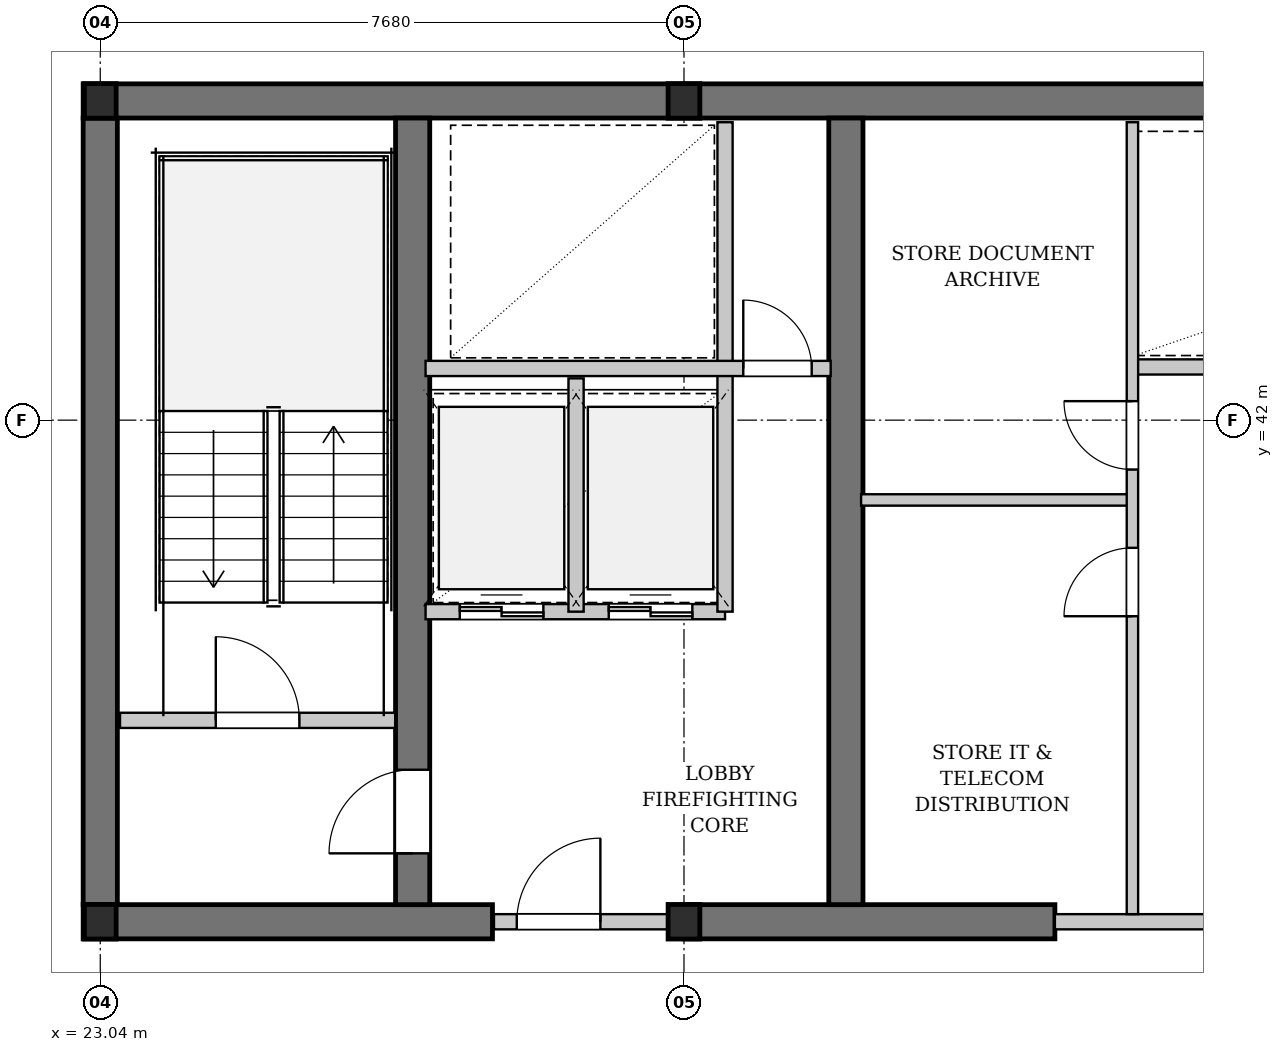
"""IFC4 building model, lengths in metres.
Left out: names, types, materials, properties, quantities, classifications, styles, units other than length and angle.
Written with IfcOpenShell. Run it as: python <this file> out.ifc"""

import sys

from ifc_helpers import new_model, si_unit, direction, frame, frame_2d, origin, origin_2d, place, context, subcontext, project, spatial, rectangle, i_section, extrude, element, fill, save


model = new_model("IFC4")
c1 = context("Model", 3, precision=1e-05, world=origin(), true_north=direction((0.0, 1.0)))
c2 = subcontext(c1, "Body", "Model", "MODEL_VIEW")
j1 = project(units=[si_unit("LENGTHUNIT", "METRE"), si_unit("PLANEANGLEUNIT", "RADIAN")], contexts=[c1])
p1 = place(None, origin())
s1 = spatial("IfcSite", under=j1, at=p1, CompositionType="ELEMENT")
p2 = place(p1, origin())
s2 = spatial("IfcBuilding", under=s1, at=p2, CompositionType="ELEMENT")
p3 = place(p2, frame((0.0, 0.0, 172.1)))
s3 = spatial("IfcBuildingStorey", under=s2, at=p3, CompositionType="ELEMENT", Elevation=172.1)
p4 = place(p3, frame((22.815, 46.2, 0.0), z_axis=(0.0, 0.0, 1.0), x_axis=(1.0, 0.0, 0.0)))
e1 = element("IfcWall", 1, at=p4, inside=s3, PredefinedType="SHEAR", context=c2, shape_type="SweptSolid", body=[
    extrude(rectangle(XDim=31.17, YDim=0.45, at=frame_2d((15.585, 0.0))), origin(), (0.0, 0.0, 1.0), 3.08),
])
p5 = place(p3, frame((22.815, 35.4, 0.0), z_axis=(0.0, 0.0, 1.0), x_axis=(1.0, 0.0, 0.0)))
e2 = element("IfcWall", 2, at=p5, inside=s3, PredefinedType="SHEAR", context=c2, shape_type="SweptSolid", body=[
    extrude(rectangle(XDim=5.385, YDim=0.45, at=frame_2d((2.692, 0.0))), origin(), (0.0, 0.0, 1.0), 3.08),
])
p6 = place(p3, frame((30.72, 35.4, 0.0), z_axis=(0.0, 0.0, 1.0), x_axis=(1.0, 0.0, 0.0)))
e3 = element("IfcWall", 3, at=p6, inside=s3, PredefinedType="SHEAR", context=c2, shape_type="SweptSolid", body=[
    extrude(rectangle(XDim=4.88, YDim=0.45, at=frame_2d((2.44, 0.0))), origin(), (0.0, 0.0, 1.0), 3.08),
])
p7 = place(p3, frame((23.04, 35.625, 0.0), z_axis=(0.0, 0.0, 1.0), x_axis=(0.0, 1.0, 0.0)))
e4 = element("IfcWall", 4, at=p7, inside=s3, PredefinedType="SHEAR", context=c2, shape_type="SweptSolid", body=[
    extrude(rectangle(XDim=10.35, YDim=0.45, at=frame_2d((5.175, 0.0))), origin(), (0.0, 0.0, 1.0), 3.08),
])
p8 = place(p3, frame((27.15, 35.625, 0.0), z_axis=(0.0, 0.0, 1.0), x_axis=(0.0, 1.0, 0.0)))
e5 = element("IfcWall", 5, at=p8, inside=s3, PredefinedType="SHEAR", context=c2, shape_type="SweptSolid", body=[
    extrude(rectangle(XDim=10.35, YDim=0.45, at=frame_2d((5.175, 0.0))), origin(), (0.0, 0.0, 1.0), 3.08),
])
p9 = place(p8, frame((0.675, 0.0, 0.0)))
e6 = element("IfcOpeningElement", 6, at=p9, cuts=e5, PredefinedType="OPENING", context=c2, shape_type="SweptSolid", body=[
    extrude(rectangle(XDim=1.1, YDim=2.15, at=frame_2d((0.55, 1.075))), frame((0.0, 0.235, 0.0), z_axis=(0.0, -1.0, 0.0), x_axis=(1.0, 0.0, 0.0)), (0.0, 0.0, 1.0), 0.47),
])
p10 = place(p3, frame((32.85, 35.625, 0.0), z_axis=(0.0, 0.0, 1.0), x_axis=(0.0, 1.0, 0.0)))
e7 = element("IfcWall", 7, at=p10, inside=s3, PredefinedType="SHEAR", context=c2, shape_type="SweptSolid", body=[
    extrude(rectangle(XDim=10.35, YDim=0.45, at=frame_2d((5.175, 0.0))), origin(), (0.0, 0.0, 1.0), 3.08),
])
for number, where, z_axis, x_axis in (
    (8, (23.04, 35.4, 0.0), (0.0, 0.0, 1.0), (1.0, 0.0, 0.0)),
    (9, (23.04, 46.2, 0.0), (0.0, 0.0, 1.0), (1.0, 0.0, 0.0)),
    (10, (30.72, 35.4, 0.0), (0.0, 0.0, 1.0), (1.0, 0.0, 0.0)),
    (11, (30.72, 46.2, 0.0), (0.0, 0.0, 1.0), (1.0, 0.0, 0.0)),
):
    element("IfcColumn", number, at=place(p3, frame(where, z_axis=z_axis, x_axis=x_axis)), inside=s3, PredefinedType="COLUMN", context=c2, shape_type="SweptSolid", body=[
        extrude(i_section(OverallWidth=0.418, OverallDepth=0.455, WebThickness=0.042, FlangeThickness=0.068, FilletRadius=0.015, at=origin_2d()), origin(), (0.0, 0.0, 1.0), 3.3),
    ])
p11 = place(p3, frame((23.3, 38.05, 0.0), z_axis=(0.0, 0.0, 1.0), x_axis=(1.0, 0.0, 0.0)))
e12 = element("IfcWall", 12, at=p11, inside=s3, PredefinedType="PARTITIONING", context=c2, shape_type="SweptSolid", body=[
    extrude(rectangle(XDim=3.62, YDim=0.2, at=frame_2d((1.81, 0.0))), origin(), (0.0, 0.0, 1.0), 3.08),
])
p12 = place(p11, frame((1.26, 0.0, 0.0)))
e13 = element("IfcOpeningElement", 13, at=p12, cuts=e12, PredefinedType="OPENING", context=c2, shape_type="SweptSolid", body=[
    extrude(rectangle(XDim=1.1, YDim=2.15, at=frame_2d((0.55, 1.075))), frame((0.0, 0.11, 0.0), z_axis=(0.0, -1.0, 0.0), x_axis=(1.0, 0.0, 0.0)), (0.0, 0.0, 1.0), 0.22),
])
p13 = place(p3, frame((28.22, 35.4, 0.0), z_axis=(0.0, 0.0, 1.0), x_axis=(1.0, 0.0, 0.0)))
e14 = element("IfcWall", 14, at=p13, inside=s3, PredefinedType="PARTITIONING", context=c2, shape_type="SweptSolid", body=[
    extrude(rectangle(XDim=2.5, YDim=0.2, at=frame_2d((1.25, 0.0))), origin(), (0.0, 0.0, 1.0), 2.475),
])
p14 = place(p13, frame((0.3, 0.0, 0.0)))
e15 = element("IfcOpeningElement", 15, at=p14, cuts=e14, PredefinedType="OPENING", context=c2, shape_type="SweptSolid", body=[
    extrude(rectangle(XDim=1.1, YDim=2.15, at=frame_2d((0.55, 1.075))), frame((0.0, 0.11, 0.0), z_axis=(0.0, -1.0, 0.0), x_axis=(1.0, 0.0, 0.0)), (0.0, 0.0, 1.0), 0.22),
])
p15 = place(p3, frame((27.32, 39.48, 0.0), z_axis=(0.0, 0.0, 1.0), x_axis=(1.0, 0.0, 0.0)))
e16 = element("IfcWall", 16, at=p15, inside=s3, PredefinedType="PARTITIONING", context=c2, shape_type="SweptSolid", body=[
    extrude(rectangle(XDim=3.94, YDim=0.2, at=frame_2d((1.97, 0.0))), origin(), (0.0, 0.0, 1.0), 3.08),
])
p16 = place(p15, frame((0.45, 0.0, 0.0)))
e17 = element("IfcOpeningElement", 17, at=p16, cuts=e16, PredefinedType="OPENING", context=c2, shape_type="SweptSolid", body=[
    extrude(rectangle(XDim=1.1, YDim=2.2, at=frame_2d((0.55, 1.1))), frame((0.0, 0.11, 0.0), z_axis=(0.0, -1.0, 0.0), x_axis=(1.0, 0.0, 0.0)), (0.0, 0.0, 1.0), 0.22),
])
p17 = place(p15, frame((2.41, 0.0, 0.0)))
e18 = element("IfcOpeningElement", 18, at=p17, cuts=e16, PredefinedType="OPENING", context=c2, shape_type="SweptSolid", body=[
    extrude(rectangle(XDim=1.1, YDim=2.2, at=frame_2d((0.55, 1.1))), frame((0.0, 0.11, 0.0), z_axis=(0.0, -1.0, 0.0), x_axis=(1.0, 0.0, 0.0)), (0.0, 0.0, 1.0), 0.22),
])
p18 = place(p3, frame((29.3, 39.48, 0.0), z_axis=(0.0, 0.0, 1.0), x_axis=(0.0, 1.0, 0.0)))
e19 = element("IfcWall", 19, at=p18, inside=s3, PredefinedType="PARTITIONING", context=c2, shape_type="SweptSolid", body=[
    extrude(rectangle(XDim=3.07, YDim=0.2, at=frame_2d((1.535, 0.0))), origin(), (0.0, 0.0, 1.0), 3.08),
])
p19 = place(p3, frame((31.26, 39.48, 0.0), z_axis=(0.0, 0.0, 1.0), x_axis=(0.0, 1.0, 0.0)))
e20 = element("IfcWall", 20, at=p19, inside=s3, PredefinedType="PARTITIONING", context=c2, shape_type="SweptSolid", body=[
    extrude(rectangle(XDim=6.44, YDim=0.2, at=frame_2d((3.22, 0.0))), origin(), (0.0, 0.0, 1.0), 3.08),
])
p20 = place(p3, frame((27.32, 42.68, 0.0), z_axis=(0.0, 0.0, 1.0), x_axis=(1.0, 0.0, 0.0)))
e21 = element("IfcWall", 21, at=p20, inside=s3, PredefinedType="PARTITIONING", context=c2, shape_type="SweptSolid", body=[
    extrude(rectangle(XDim=5.33, YDim=0.2, at=frame_2d((2.665, 0.0))), origin(), (0.0, 0.0, 1.0), 3.08),
])
p21 = place(p20, frame((4.18, 0.0, 0.0)))
e22 = element("IfcOpeningElement", 22, at=p21, cuts=e21, PredefinedType="OPENING", context=c2, shape_type="SweptSolid", body=[
    extrude(rectangle(XDim=0.9, YDim=2.15, at=frame_2d((0.45, 1.075))), frame((0.0, 0.11, 0.0), z_axis=(0.0, -1.0, 0.0), x_axis=(1.0, 0.0, 0.0)), (0.0, 0.0, 1.0), 0.22),
])
p22 = place(p3, frame((35.6, 35.4, 0.0), z_axis=(0.0, 0.0, 1.0), x_axis=(1.0, 0.0, 0.0)))
e23 = element("IfcWall", 23, at=p22, inside=s3, PredefinedType="PARTITIONING", context=c2, shape_type="SweptSolid", body=[
    extrude(rectangle(XDim=6.5, YDim=0.2, at=frame_2d((3.25, 0.0))), origin(), (0.0, 0.0, 1.0), 2.475),
])
p23 = place(p22, frame((3.8, 0.0, 0.0)))
e24 = element("IfcOpeningElement", 24, at=p23, cuts=e23, PredefinedType="OPENING", context=c2, shape_type="SweptSolid", body=[
    extrude(rectangle(XDim=1.8, YDim=2.3, at=frame_2d((0.9, 1.15))), frame((0.0, 0.11, 0.0), z_axis=(0.0, -1.0, 0.0), x_axis=(1.0, 0.0, 0.0)), (0.0, 0.0, 1.0), 0.22),
])
p24 = place(p3, frame((36.6, 42.7, 0.0), z_axis=(0.0, 0.0, 1.0), x_axis=(1.0, 0.0, 0.0)))
e25 = element("IfcWall", 25, at=p24, inside=s3, PredefinedType="PARTITIONING", context=c2, shape_type="SweptSolid", body=[
    extrude(rectangle(XDim=5.25, YDim=0.2, at=frame_2d((2.625, 0.0))), origin(), (0.0, 0.0, 1.0), 3.08),
])
p25 = place(p3, frame((33.05, 40.95, 0.0), z_axis=(0.0, 0.0, 1.0), x_axis=(1.0, 0.0, 0.0)))
e26 = element("IfcWall", 26, at=p25, inside=s3, PredefinedType="PARTITIONING", context=c2, shape_type="SweptSolid", body=[
    extrude(rectangle(XDim=3.57, YDim=0.15, at=frame_2d((1.785, 0.0))), origin(), (0.0, 0.0, 1.0), 3.08),
])
p26 = place(p3, frame((36.62, 35.5, 0.0), z_axis=(0.0, 0.0, 1.0), x_axis=(0.0, 1.0, 0.0)))
e27 = element("IfcWall", 27, at=p26, inside=s3, PredefinedType="PARTITIONING", context=c2, shape_type="SweptSolid", body=[
    extrude(rectangle(XDim=10.42, YDim=0.15, at=frame_2d((5.21, 0.0))), origin(), (0.0, 0.0, 1.0), 3.08),
])
p27 = place(p26, frame((3.92, 0.0, 0.0)))
e28 = element("IfcOpeningElement", 28, at=p27, cuts=e27, PredefinedType="OPENING", context=c2, shape_type="SweptSolid", body=[
    extrude(rectangle(XDim=0.9, YDim=2.15, at=frame_2d((0.45, 1.075))), frame((0.0, 0.085, 0.0), z_axis=(0.0, -1.0, 0.0), x_axis=(1.0, 0.0, 0.0)), (0.0, 0.0, 1.0), 0.17),
])
p28 = place(p26, frame((5.85, 0.0, 0.0)))
e29 = element("IfcOpeningElement", 29, at=p28, cuts=e27, PredefinedType="OPENING", context=c2, shape_type="SweptSolid", body=[
    extrude(rectangle(XDim=0.9, YDim=2.15, at=frame_2d((0.45, 1.075))), frame((0.0, 0.085, 0.0), z_axis=(0.0, -1.0, 0.0), x_axis=(1.0, 0.0, 0.0)), (0.0, 0.0, 1.0), 0.17),
])
p29 = place(p12, origin())
e30 = element("IfcDoor", 30, at=p29, inside=s3, OperationType="SINGLE_SWING_LEFT", PredefinedType="DOOR", context=c2, shape_type="SweptSolid", body=[
    extrude(rectangle(XDim=1.1, YDim=2.15, at=frame_2d((0.55, 1.075))), frame((0.0, 0.025, 0.0), z_axis=(0.0, -1.0, 0.0), x_axis=(1.0, 0.0, 0.0)), (0.0, 0.0, 1.0), 0.05),
])
fill(e13, e30)
p30 = place(p14, origin())
e31 = element("IfcDoor", 31, at=p30, inside=s3, OperationType="SINGLE_SWING_RIGHT", PredefinedType="DOOR", context=c2, shape_type="SweptSolid", body=[
    extrude(rectangle(XDim=1.1, YDim=2.15, at=frame_2d((0.55, 1.075))), frame((0.0, 0.025, 0.0), z_axis=(0.0, -1.0, 0.0), x_axis=(1.0, 0.0, 0.0)), (0.0, 0.0, 1.0), 0.05),
])
fill(e15, e31)
p31 = place(p16, origin())
e32 = element("IfcDoor", 32, at=p31, inside=s3, OperationType="DOUBLE_DOOR_SLIDING", PredefinedType="DOOR", context=c2, shape_type="SweptSolid", body=[
    extrude(rectangle(XDim=1.1, YDim=2.2, at=frame_2d((0.55, 1.1))), frame((0.0, 0.025, 0.0), z_axis=(0.0, -1.0, 0.0), x_axis=(1.0, 0.0, 0.0)), (0.0, 0.0, 1.0), 0.05),
])
fill(e17, e32)
p32 = place(p17, origin())
e33 = element("IfcDoor", 33, at=p32, inside=s3, OperationType="DOUBLE_DOOR_SLIDING", PredefinedType="DOOR", context=c2, shape_type="SweptSolid", body=[
    extrude(rectangle(XDim=1.1, YDim=2.2, at=frame_2d((0.55, 1.1))), frame((0.0, 0.025, 0.0), z_axis=(0.0, -1.0, 0.0), x_axis=(1.0, 0.0, 0.0)), (0.0, 0.0, 1.0), 0.05),
])
fill(e18, e33)
p33 = place(p21, origin())
e34 = element("IfcDoor", 34, at=p33, inside=s3, OperationType="SINGLE_SWING_LEFT", PredefinedType="DOOR", context=c2, shape_type="SweptSolid", body=[
    extrude(rectangle(XDim=0.9, YDim=2.15, at=frame_2d((0.45, 1.075))), frame((0.0, 0.025, 0.0), z_axis=(0.0, -1.0, 0.0), x_axis=(1.0, 0.0, 0.0)), (0.0, 0.0, 1.0), 0.05),
])
fill(e22, e34)
p34 = place(p27, origin())
e35 = element("IfcDoor", 35, at=p34, inside=s3, OperationType="SINGLE_SWING_LEFT", PredefinedType="DOOR", context=c2, shape_type="SweptSolid", body=[
    extrude(rectangle(XDim=0.9, YDim=2.15, at=frame_2d((0.45, 1.075))), frame((0.0, 0.025, 0.0), z_axis=(0.0, -1.0, 0.0), x_axis=(1.0, 0.0, 0.0)), (0.0, 0.0, 1.0), 0.05),
])
fill(e28, e35)
p35 = place(p28, origin())
e36 = element("IfcDoor", 36, at=p35, inside=s3, OperationType="SINGLE_SWING_RIGHT", PredefinedType="DOOR", context=c2, shape_type="SweptSolid", body=[
    extrude(rectangle(XDim=0.9, YDim=2.15, at=frame_2d((0.45, 1.075))), frame((0.0, 0.025, 0.0), z_axis=(0.0, -1.0, 0.0), x_axis=(1.0, 0.0, 0.0)), (0.0, 0.0, 1.0), 0.05),
])
fill(e29, e36)
p36 = place(p9, origin())
e37 = element("IfcDoor", 37, at=p36, inside=s3, OperationType="SINGLE_SWING_LEFT", PredefinedType="DOOR", context=c2, shape_type="SweptSolid", body=[
    extrude(rectangle(XDim=1.1, YDim=2.15, at=frame_2d((0.55, 1.075))), frame((0.0, 0.025, 0.0), z_axis=(0.0, -1.0, 0.0), x_axis=(1.0, 0.0, 0.0)), (0.0, 0.0, 1.0), 0.05),
])
fill(e6, e37)
save(model, sys.argv[1])
